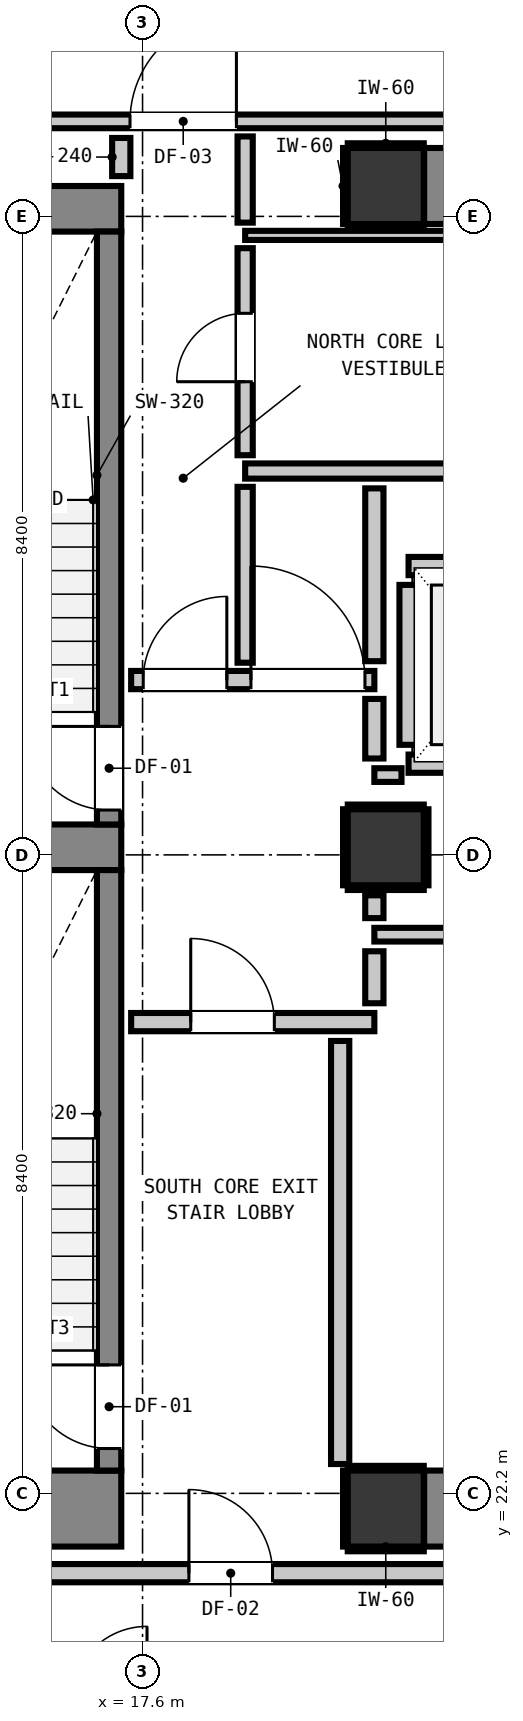
"""IFC4 building model, lengths in metres.
Left out: names, types, materials, properties, quantities, classifications, styles, units other than length and angle.
Written with IfcOpenShell. Run it as: python <this file> out.ifc"""

import sys

from ifc_helpers import new_model, si_unit, direction, frame, frame_2d, origin, origin_2d, place, context, subcontext, project, spatial, rectangle, extrude, element, fill, save


model = new_model("IFC4")
c1 = context("Model", 3, precision=1e-05, world=origin(), true_north=direction((0.0, 1.0)))
c2 = subcontext(c1, "Body", "Model", "MODEL_VIEW")
j1 = project(units=[si_unit("LENGTHUNIT", "METRE"), si_unit("PLANEANGLEUNIT", "RADIAN")], contexts=[c1])
p1 = place(None, origin())
s1 = spatial("IfcSite", under=j1, at=p1, CompositionType="ELEMENT")
p2 = place(p1, origin())
s2 = spatial("IfcBuilding", under=s1, at=p2, CompositionType="ELEMENT")
p3 = place(p2, frame((0.0, 0.0, 145.92)))
s3 = spatial("IfcBuildingStorey", under=s2, at=p3, CompositionType="ELEMENT", Elevation=145.92)
for number, where, z_axis, x_axis in (
    (1, (20.8, 22.0, 0.0), (0.0, 0.0, 1.0), (1.0, 0.0, 0.0)),
    (2, (20.8, 39.4, 0.0), (0.0, 0.0, 1.0), (1.0, 0.0, 0.0)),
):
    element("IfcColumn", number, at=place(p3, frame(where, z_axis=z_axis, x_axis=x_axis)), inside=s3, PredefinedType="COLUMN", context=c2, shape_type="SweptSolid", body=[
        extrude(rectangle(XDim=1.0, YDim=1.0, at=origin_2d()), origin(), (0.0, 0.0, 1.0), 3.32),
    ])
p4 = place(p3, frame((13.24, 22.0, 0.0), z_axis=(0.0, 0.0, 1.0), x_axis=(1.0, 0.0, 0.0)))
e3 = element("IfcWall", 3, at=p4, inside=s3, PredefinedType="SHEAR", context=c2, shape_type="SweptSolid", body=[
    extrude(rectangle(XDim=4.08, YDim=1.0, at=frame_2d((2.04, 0.0))), origin(), (0.0, 0.0, 1.0), 3.32),
])
p5 = place(p3, frame((13.24, 39.1, 0.0), z_axis=(0.0, 0.0, 1.0), x_axis=(1.0, 0.0, 0.0)))
e4 = element("IfcWall", 4, at=p5, inside=s3, PredefinedType="SHEAR", context=c2, shape_type="SweptSolid", body=[
    extrude(rectangle(XDim=4.08, YDim=0.6, at=frame_2d((2.04, 0.0))), origin(), (0.0, 0.0, 1.0), 3.32),
])
p6 = place(p3, frame((13.905, 30.7, 0.0), z_axis=(0.0, 0.0, 1.0), x_axis=(1.0, 0.0, 0.0)))
e5 = element("IfcWall", 5, at=p6, inside=s3, PredefinedType="SHEAR", context=c2, shape_type="SweptSolid", body=[
    extrude(rectangle(XDim=3.415, YDim=0.6, at=frame_2d((1.708, 0.0))), origin(), (0.0, 0.0, 1.0), 3.32),
])
for number, where, z_axis, x_axis in (
    (6, (21.305, 22.0, 0.0), (0.0, 0.0, 1.0), (1.0, 0.0, 0.0)),
    (7, (21.305, 39.4, 0.0), (0.0, 0.0, 1.0), (1.0, 0.0, 0.0)),
):
    element("IfcWall", number, at=place(p3, frame(where, z_axis=z_axis, x_axis=x_axis)), inside=s3, PredefinedType="SHEAR", context=c2, shape_type="SweptSolid", body=[
        extrude(rectangle(XDim=7.39, YDim=1.0, at=frame_2d((3.695, 0.0))), origin(), (0.0, 0.0, 1.0), 3.32),
    ])
p7 = place(p3, frame((17.16, 31.0, 0.0), z_axis=(0.0, 0.0, 1.0), x_axis=(0.0, 1.0, 0.0)))
e8 = element("IfcWall", 8, at=p7, inside=s3, PredefinedType="SHEAR", context=c2, shape_type="SweptSolid", body=[
    extrude(rectangle(XDim=7.8, YDim=0.32, at=frame_2d((3.9, 0.0))), origin(), (0.0, 0.0, 1.0), 3.32),
])
p8 = place(p7, frame((0.19, 0.0, 0.0)))
e9 = element("IfcOpeningElement", 9, at=p8, cuts=e8, PredefinedType="OPENING", context=c2, shape_type="SweptSolid", body=[
    extrude(rectangle(XDim=1.1, YDim=2.15, at=frame_2d((0.55, 1.075))), frame((0.0, 0.17, 0.0), z_axis=(0.0, -1.0, 0.0), x_axis=(1.0, 0.0, 0.0)), (0.0, 0.0, 1.0), 0.34),
])
p9 = place(p3, frame((17.16, 22.5, 0.0), z_axis=(0.0, 0.0, 1.0), x_axis=(0.0, 1.0, 0.0)))
e10 = element("IfcWall", 10, at=p9, inside=s3, PredefinedType="SHEAR", context=c2, shape_type="SweptSolid", body=[
    extrude(rectangle(XDim=7.9, YDim=0.32, at=frame_2d((3.95, 0.0))), origin(), (0.0, 0.0, 1.0), 3.32),
])
p10 = place(p9, frame((0.29, 0.0, 0.0)))
e11 = element("IfcOpeningElement", 11, at=p10, cuts=e10, PredefinedType="OPENING", context=c2, shape_type="SweptSolid", body=[
    extrude(rectangle(XDim=1.1, YDim=2.15, at=frame_2d((0.55, 1.075))), frame((0.0, 0.17, 0.0), z_axis=(0.0, -1.0, 0.0), x_axis=(1.0, 0.0, 0.0)), (0.0, 0.0, 1.0), 0.34),
])
p11 = place(p3, frame((20.8, 30.7, 0.0), z_axis=(0.0, 0.0, 1.0), x_axis=(1.0, 0.0, 0.0)))
e12 = element("IfcColumn", 12, at=p11, inside=s3, PredefinedType="COLUMN", context=c2, shape_type="SweptSolid", body=[
    extrude(rectangle(XDim=1.0, YDim=1.0, at=origin_2d()), origin(), (0.0, 0.0, 1.0), 3.32),
])
for number, where, z_axis, x_axis in (
    (13, (21.1, 31.8, 0.0), (0.0, 0.0, 1.0), (1.0, 0.0, 0.0)),
    (14, (21.1, 34.4, 0.0), (0.0, 0.0, 1.0), (1.0, 0.0, 0.0)),
):
    element("IfcWall", number, at=place(p3, frame(where, z_axis=z_axis, x_axis=x_axis)), inside=s3, PredefinedType="PARTITIONING", context=c2, shape_type="SweptSolid", body=[
        extrude(rectangle(XDim=2.2, YDim=0.24, at=frame_2d((1.1, 0.0))), origin(), (0.0, 0.0, 1.0), 3.08),
    ])
p12 = place(p3, frame((21.1, 32.048, 0.0), z_axis=(0.0, 0.0, 1.0), x_axis=(0.0, 1.0, 0.0)))
e15 = element("IfcWall", 15, at=p12, inside=s3, PredefinedType="PARTITIONING", context=c2, shape_type="SweptSolid", body=[
    extrude(rectangle(XDim=2.104, YDim=0.24, at=frame_2d((1.052, 0.0))), origin(), (0.0, 0.0, 1.0), 2.315),
])
p13 = place(p3, frame((9.407, 21.15, 0.0), z_axis=(0.0, 0.0, 1.0), x_axis=(1.0, 0.0, 0.0)))
e16 = element("IfcWall", 16, at=p13, inside=s3, PredefinedType="PARTITIONING", context=c2, shape_type="SweptSolid", body=[
    extrude(rectangle(XDim=27.532, YDim=0.24, at=frame_2d((13.766, 0.0))), origin(), (0.0, 0.0, 1.0), 3.08),
])
p14 = place(p13, frame((8.803, 0.0, 0.0)))
e17 = element("IfcOpeningElement", 17, at=p14, cuts=e16, PredefinedType="OPENING", context=c2, shape_type="SweptSolid", body=[
    extrude(rectangle(XDim=1.1, YDim=2.15, at=frame_2d((0.55, 1.075))), frame((0.0, 0.13, 0.0), z_axis=(0.0, -1.0, 0.0), x_axis=(1.0, 0.0, 0.0)), (0.0, 0.0, 1.0), 0.26),
])
p15 = place(p13, frame((1.192, 0.0, 0.0)))
e18 = element("IfcOpeningElement", 18, at=p15, cuts=e16, PredefinedType="OPENING", context=c2, shape_type="SweptSolid", body=[
    extrude(rectangle(XDim=1.4, YDim=2.15, at=frame_2d((0.7, 1.075))), frame((0.0, 0.13, 0.0), z_axis=(0.0, -1.0, 0.0), x_axis=(1.0, 0.0, 0.0)), (0.0, 0.0, 1.0), 0.26),
])
p16 = place(p3, frame((17.45, 28.4, 0.0), z_axis=(0.0, 0.0, 1.0), x_axis=(1.0, 0.0, 0.0)))
e19 = element("IfcWall", 19, at=p16, inside=s3, PredefinedType="PARTITIONING", context=c2, shape_type="SweptSolid", body=[
    extrude(rectangle(XDim=3.2, YDim=0.24, at=frame_2d((1.6, 0.0))), origin(), (0.0, 0.0, 1.0), 3.08),
])
p17 = place(p16, frame((0.784, 0.0, 0.0)))
e20 = element("IfcOpeningElement", 20, at=p17, cuts=e19, PredefinedType="OPENING", context=c2, shape_type="SweptSolid", body=[
    extrude(rectangle(XDim=1.1, YDim=2.15, at=frame_2d((0.55, 1.075))), frame((0.0, 0.13, 0.0), z_axis=(0.0, -1.0, 0.0), x_axis=(1.0, 0.0, 0.0)), (0.0, 0.0, 1.0), 0.26),
])
p18 = place(p3, frame((17.45, 32.9, 0.0), z_axis=(0.0, 0.0, 1.0), x_axis=(1.0, 0.0, 0.0)))
e21 = element("IfcWall", 21, at=p18, inside=s3, PredefinedType="PARTITIONING", context=c2, shape_type="SweptSolid", body=[
    extrude(rectangle(XDim=3.2, YDim=0.24, at=frame_2d((1.6, 0.0))), origin(), (0.0, 0.0, 1.0), 3.08),
])
p19 = place(p18, frame((0.159, 0.0, 0.0)))
e22 = element("IfcOpeningElement", 22, at=p19, cuts=e21, PredefinedType="OPENING", context=c2, shape_type="SweptSolid", body=[
    extrude(rectangle(XDim=1.1, YDim=2.15, at=frame_2d((0.55, 1.075))), frame((0.0, 0.13, 0.0), z_axis=(0.0, -1.0, 0.0), x_axis=(1.0, 0.0, 0.0)), (0.0, 0.0, 1.0), 0.26),
])
p20 = place(p18, frame((1.576, 0.0, 0.0)))
e23 = element("IfcOpeningElement", 23, at=p20, cuts=e21, PredefinedType="OPENING", context=c2, shape_type="SweptSolid", body=[
    extrude(rectangle(XDim=1.5, YDim=2.15, at=frame_2d((0.75, 1.075))), frame((0.0, 0.13, 0.0), z_axis=(0.0, -1.0, 0.0), x_axis=(1.0, 0.0, 0.0)), (0.0, 0.0, 1.0), 0.26),
])
p21 = place(p3, frame((18.95, 35.65, 0.0), z_axis=(0.0, 0.0, 1.0), x_axis=(1.0, 0.0, 0.0)))
e24 = element("IfcWall", 24, at=p21, inside=s3, PredefinedType="PARTITIONING", context=c2, shape_type="SweptSolid", body=[
    extrude(rectangle(XDim=11.025, YDim=0.2, at=frame_2d((5.513, 0.0))), origin(), (0.0, 0.0, 1.0), 3.08),
])
p22 = place(p3, frame((20.65, 29.55, 0.0), z_axis=(0.0, 0.0, 1.0), x_axis=(1.0, 0.0, 0.0)))
e25 = element("IfcWall", 25, at=p22, inside=s3, PredefinedType="PARTITIONING", context=c2, shape_type="SweptSolid", body=[
    extrude(rectangle(XDim=9.325, YDim=0.18, at=frame_2d((4.663, 0.0))), origin(), (0.0, 0.0, 1.0), 3.08),
])
p23 = place(p3, frame((20.65, 31.65, 0.0), z_axis=(0.0, 0.0, 1.0), x_axis=(1.0, 0.0, 0.0)))
e26 = element("IfcWall", 26, at=p23, inside=s3, PredefinedType="PARTITIONING", context=c2, shape_type="SweptSolid", body=[
    extrude(rectangle(XDim=0.357, YDim=0.18, at=frame_2d((0.179, 0.0))), origin(), (0.0, 0.0, 1.0), 3.08),
])
p24 = place(p3, frame((9.407, 40.25, 0.0), z_axis=(0.0, 0.0, 1.0), x_axis=(1.0, 0.0, 0.0)))
e27 = element("IfcWall", 27, at=p24, inside=s3, PredefinedType="PARTITIONING", context=c2, shape_type="SweptSolid", body=[
    extrude(rectangle(XDim=39.386, YDim=0.18, at=frame_2d((19.693, 0.0))), origin(), (0.0, 0.0, 1.0), 3.08),
])
p25 = place(p24, frame((8.028, 0.0, 0.0)))
e28 = element("IfcOpeningElement", 28, at=p25, cuts=e27, PredefinedType="OPENING", context=c2, shape_type="SweptSolid", body=[
    extrude(rectangle(XDim=1.4, YDim=2.15, at=frame_2d((0.7, 1.075))), frame((0.0, 0.1, 0.0), z_axis=(0.0, -1.0, 0.0), x_axis=(1.0, 0.0, 0.0)), (0.0, 0.0, 1.0), 0.2),
])
p26 = place(p24, frame((1.192, 0.0, 0.0)))
e29 = element("IfcOpeningElement", 29, at=p26, cuts=e27, PredefinedType="OPENING", context=c2, shape_type="SweptSolid", body=[
    extrude(rectangle(XDim=1.4, YDim=2.15, at=frame_2d((0.7, 1.075))), frame((0.0, 0.1, 0.0), z_axis=(0.0, -1.0, 0.0), x_axis=(1.0, 0.0, 0.0)), (0.0, 0.0, 1.0), 0.2),
])
p27 = place(p24, frame((28.643, 0.0, 0.0)))
e30 = element("IfcOpeningElement", 30, at=p27, cuts=e27, PredefinedType="OPENING", context=c2, shape_type="SweptSolid", body=[
    extrude(rectangle(XDim=1.4, YDim=2.15, at=frame_2d((0.7, 1.075))), frame((0.0, 0.1, 0.0), z_axis=(0.0, -1.0, 0.0), x_axis=(1.0, 0.0, 0.0)), (0.0, 0.0, 1.0), 0.2),
])
p28 = place(p3, frame((18.95, 38.75, 0.0), z_axis=(0.0, 0.0, 1.0), x_axis=(1.0, 0.0, 0.0)))
e31 = element("IfcWall", 31, at=p28, inside=s3, PredefinedType="PARTITIONING", context=c2, shape_type="SweptSolid", body=[
    extrude(rectangle(XDim=13.56, YDim=0.12, at=frame_2d((6.78, 0.0))), origin(), (0.0, 0.0, 1.0), 3.08),
])
p29 = place(p3, frame((17.32, 39.53, 0.0), z_axis=(0.0, 0.0, 1.0), x_axis=(0.0, 1.0, 0.0)))
e32 = element("IfcWall", 32, at=p29, inside=s3, PredefinedType="PARTITIONING", context=c2, shape_type="SweptSolid", body=[
    extrude(rectangle(XDim=0.502, YDim=0.24, at=frame_2d((0.251, 0.0))), origin(), (0.0, 0.0, 1.0), 3.08),
])
p30 = place(p3, frame((20.2, 22.586, 0.0), z_axis=(0.0, 0.0, 1.0), x_axis=(0.0, 1.0, 0.0)))
e33 = element("IfcWall", 33, at=p30, inside=s3, PredefinedType="PARTITIONING", context=c2, shape_type="SweptSolid", body=[
    extrude(rectangle(XDim=5.566, YDim=0.24, at=frame_2d((2.783, 0.0))), origin(), (0.0, 0.0, 1.0), 3.08),
])
p31 = place(p3, frame((20.65, 28.648, 0.0), z_axis=(0.0, 0.0, 1.0), x_axis=(0.0, 1.0, 0.0)))
e34 = element("IfcWall", 34, at=p31, inside=s3, PredefinedType="PARTITIONING", context=c2, shape_type="SweptSolid", body=[
    extrude(rectangle(XDim=0.684, YDim=0.24, at=frame_2d((0.342, 0.0))), origin(), (0.0, 0.0, 1.0), 2.315),
])
p32 = place(p3, frame((20.65, 29.768, 0.0), z_axis=(0.0, 0.0, 1.0), x_axis=(0.0, 1.0, 0.0)))
e35 = element("IfcWall", 35, at=p32, inside=s3, PredefinedType="PARTITIONING", context=c2, shape_type="SweptSolid", body=[
    extrude(rectangle(XDim=0.3, YDim=0.24, at=frame_2d((0.15, 0.0))), origin(), (0.0, 0.0, 1.0), 2.315),
])
p33 = place(p3, frame((20.65, 31.868, 0.0), z_axis=(0.0, 0.0, 1.0), x_axis=(0.0, 1.0, 0.0)))
e36 = element("IfcWall", 36, at=p33, inside=s3, PredefinedType="PARTITIONING", context=c2, shape_type="SweptSolid", body=[
    extrude(rectangle(XDim=0.784, YDim=0.24, at=frame_2d((0.392, 0.0))), origin(), (0.0, 0.0, 1.0), 2.315),
])
p34 = place(p3, frame((20.65, 33.148, 0.0), z_axis=(0.0, 0.0, 1.0), x_axis=(0.0, 1.0, 0.0)))
e37 = element("IfcWall", 37, at=p34, inside=s3, PredefinedType="PARTITIONING", context=c2, shape_type="SweptSolid", body=[
    extrude(rectangle(XDim=2.274, YDim=0.24, at=frame_2d((1.137, 0.0))), origin(), (0.0, 0.0, 1.0), 2.315),
])
p35 = place(p3, frame((18.95, 33.128, 0.0), z_axis=(0.0, 0.0, 1.0), x_axis=(0.0, 1.0, 0.0)))
e38 = element("IfcWall", 38, at=p35, inside=s3, PredefinedType="PARTITIONING", context=c2, shape_type="SweptSolid", body=[
    extrude(rectangle(XDim=2.314, YDim=0.2, at=frame_2d((1.157, 0.0))), origin(), (0.0, 0.0, 1.0), 3.08),
])
p36 = place(p3, frame((18.95, 35.858, 0.0), z_axis=(0.0, 0.0, 1.0), x_axis=(0.0, 1.0, 0.0)))
e39 = element("IfcWall", 39, at=p36, inside=s3, PredefinedType="PARTITIONING", context=c2, shape_type="SweptSolid", body=[
    extrude(rectangle(XDim=2.724, YDim=0.2, at=frame_2d((1.362, 0.0))), origin(), (0.0, 0.0, 1.0), 3.08),
])
p37 = place(p36, frame((0.967, 0.0, 0.0)))
e40 = element("IfcOpeningElement", 40, at=p37, cuts=e39, PredefinedType="OPENING", context=c2, shape_type="SweptSolid", body=[
    extrude(rectangle(XDim=0.9, YDim=2.1, at=frame_2d((0.45, 1.05))), frame((0.0, 0.11, 0.0), z_axis=(0.0, -1.0, 0.0), x_axis=(1.0, 0.0, 0.0)), (0.0, 0.0, 1.0), 0.22),
])
p38 = place(p3, frame((18.95, 38.918, 0.0), z_axis=(0.0, 0.0, 1.0), x_axis=(0.0, 1.0, 0.0)))
e41 = element("IfcWall", 41, at=p38, inside=s3, PredefinedType="PARTITIONING", context=c2, shape_type="SweptSolid", body=[
    extrude(rectangle(XDim=1.134, YDim=0.2, at=frame_2d((0.567, 0.0))), origin(), (0.0, 0.0, 1.0), 3.08),
])
for number, where, z_axis, x_axis in (
    (42, (20.3, 21.468, 0.0), (0.0, 0.0, 1.0), (1.0, 0.0, 0.0)),
    (43, (20.3, 22.532, 0.0), (0.0, 0.0, 1.0), (1.0, 0.0, 0.0)),
    (44, (20.268, 21.5, 0.0), (0.0, 0.0, 1.0), (0.0, 1.0, 0.0)),
    (45, (20.3, 38.868, 0.0), (0.0, 0.0, 1.0), (1.0, 0.0, 0.0)),
    (46, (20.3, 39.932, 0.0), (0.0, 0.0, 1.0), (1.0, 0.0, 0.0)),
    (47, (20.268, 38.9, 0.0), (0.0, 0.0, 1.0), (0.0, 1.0, 0.0)),
    (48, (20.3, 30.168, 0.0), (0.0, 0.0, 1.0), (1.0, 0.0, 0.0)),
    (49, (20.3, 31.232, 0.0), (0.0, 0.0, 1.0), (1.0, 0.0, 0.0)),
    (50, (20.268, 30.2, 0.0), (0.0, 0.0, 1.0), (0.0, 1.0, 0.0)),
    (51, (21.332, 30.2, 0.0), (0.0, 0.0, 1.0), (0.0, 1.0, 0.0)),
):
    element("IfcWall", number, at=place(p3, frame(where, z_axis=z_axis, x_axis=x_axis)), inside=s3, PredefinedType="PARTITIONING", context=c2, shape_type="SweptSolid", body=[
        extrude(rectangle(XDim=1.0, YDim=0.06, at=frame_2d((0.5, 0.0))), origin(), (0.0, 0.0, 1.0), 1.45),
    ])
p39 = place(p8, origin())
e52 = element("IfcDoor", 52, at=p39, inside=s3, OperationType="SINGLE_SWING_RIGHT", PredefinedType="DOOR", context=c2, shape_type="SweptSolid", body=[
    extrude(rectangle(XDim=1.1, YDim=2.15, at=frame_2d((0.55, 1.075))), frame((0.0, 0.025, 0.0), z_axis=(0.0, -1.0, 0.0), x_axis=(1.0, 0.0, 0.0)), (0.0, 0.0, 1.0), 0.05),
])
fill(e9, e52)
p40 = place(p10, origin())
e53 = element("IfcDoor", 53, at=p40, inside=s3, OperationType="SINGLE_SWING_RIGHT", PredefinedType="DOOR", context=c2, shape_type="SweptSolid", body=[
    extrude(rectangle(XDim=1.1, YDim=2.15, at=frame_2d((0.55, 1.075))), frame((0.0, 0.025, 0.0), z_axis=(0.0, -1.0, 0.0), x_axis=(1.0, 0.0, 0.0)), (0.0, 0.0, 1.0), 0.05),
])
fill(e11, e53)
p41 = place(p17, origin())
e54 = element("IfcDoor", 54, at=p41, inside=s3, OperationType="SINGLE_SWING_LEFT", PredefinedType="DOOR", context=c2, shape_type="SweptSolid", body=[
    extrude(rectangle(XDim=1.1, YDim=2.15, at=frame_2d((0.55, 1.075))), frame((0.0, 0.025, 0.0), z_axis=(0.0, -1.0, 0.0), x_axis=(1.0, 0.0, 0.0)), (0.0, 0.0, 1.0), 0.05),
])
fill(e20, e54)
p42 = place(p19, origin())
e55 = element("IfcDoor", 55, at=p42, inside=s3, OperationType="SINGLE_SWING_RIGHT", PredefinedType="DOOR", context=c2, shape_type="SweptSolid", body=[
    extrude(rectangle(XDim=1.1, YDim=2.15, at=frame_2d((0.55, 1.075))), frame((0.0, 0.025, 0.0), z_axis=(0.0, -1.0, 0.0), x_axis=(1.0, 0.0, 0.0)), (0.0, 0.0, 1.0), 0.05),
])
fill(e22, e55)
p43 = place(p14, origin())
e56 = element("IfcDoor", 56, at=p43, inside=s3, OperationType="SINGLE_SWING_LEFT", PredefinedType="DOOR", context=c2, shape_type="SweptSolid", body=[
    extrude(rectangle(XDim=1.1, YDim=2.15, at=frame_2d((0.55, 1.075))), frame((0.0, 0.025, 0.0), z_axis=(0.0, -1.0, 0.0), x_axis=(1.0, 0.0, 0.0)), (0.0, 0.0, 1.0), 0.05),
])
fill(e17, e56)
p44 = place(p25, origin())
e57 = element("IfcDoor", 57, at=p44, inside=s3, OperationType="SINGLE_SWING_RIGHT", PredefinedType="DOOR", context=c2, shape_type="SweptSolid", body=[
    extrude(rectangle(XDim=1.4, YDim=2.15, at=frame_2d((0.7, 1.075))), frame((0.0, 0.025, 0.0), z_axis=(0.0, -1.0, 0.0), x_axis=(1.0, 0.0, 0.0)), (0.0, 0.0, 1.0), 0.05),
])
fill(e28, e57)
p45 = place(p20, origin())
e58 = element("IfcDoor", 58, at=p45, inside=s3, OperationType="SINGLE_SWING_LEFT", PredefinedType="DOOR", context=c2, shape_type="SweptSolid", body=[
    extrude(rectangle(XDim=1.5, YDim=2.15, at=frame_2d((0.75, 1.075))), frame((0.0, 0.025, 0.0), z_axis=(0.0, -1.0, 0.0), x_axis=(1.0, 0.0, 0.0)), (0.0, 0.0, 1.0), 0.05),
])
fill(e23, e58)
p46 = place(p37, origin())
e59 = element("IfcDoor", 59, at=p46, inside=s3, OperationType="SINGLE_SWING_LEFT", PredefinedType="DOOR", context=c2, shape_type="SweptSolid", body=[
    extrude(rectangle(XDim=0.9, YDim=2.1, at=frame_2d((0.45, 1.05))), frame((0.0, 0.025, 0.0), z_axis=(0.0, -1.0, 0.0), x_axis=(1.0, 0.0, 0.0)), (0.0, 0.0, 1.0), 0.05),
])
fill(e40, e59)
save(model, sys.argv[1])
